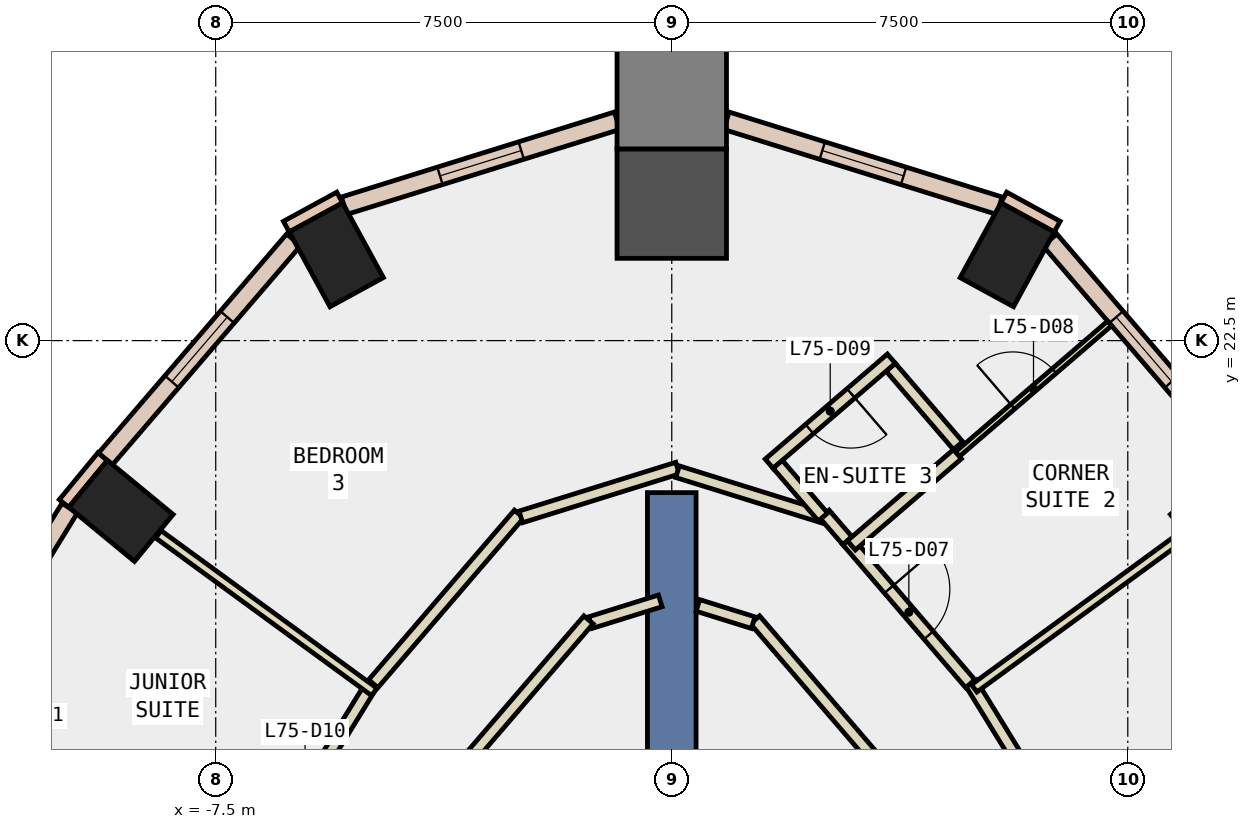
"""IFC4 building model, lengths in metres.
Left out: names, types, materials, properties, quantities, classifications, styles, units other than length and angle.
Written with IfcOpenShell. Run it as: python <this file> out.ifc"""

import sys

from ifc_helpers import new_model, si_unit, direction, frame, frame_2d, origin, origin_2d, place, context, subcontext, project, spatial, rectangle, extrude, element, fill, save


model = new_model("IFC4")
c1 = context("Model", 3, precision=1e-05, world=origin(), true_north=direction((0.0, 1.0)))
c2 = subcontext(c1, "Body", "Model", "MODEL_VIEW")
j1 = project(units=[si_unit("LENGTHUNIT", "METRE"), si_unit("PLANEANGLEUNIT", "RADIAN")], contexts=[c1])
p1 = place(None, origin())
s1 = spatial("IfcSite", under=j1, at=p1, CompositionType="ELEMENT")
p2 = place(p1, origin())
s2 = spatial("IfcBuilding", under=s1, at=p2, CompositionType="ELEMENT")
p3 = place(p2, frame((0.0, 0.0, 318.8)))
s3 = spatial("IfcBuildingStorey", under=s2, at=p3, CompositionType="ELEMENT", Elevation=318.8)
for number, where, z_axis, x_axis in (
    (1, (9.059, 19.7, -0.34), (0.0, 0.0, 1.0), (-0.636, 0.772, 0.0)),
    (2, (5.517, 23.911, -0.34), (0.0, 0.0, 1.0), (-0.878, 0.479, 0.0)),
):
    element("IfcColumn", number, at=place(p3, frame(where, z_axis=z_axis, x_axis=x_axis)), inside=s3, PredefinedType="COLUMN", context=c2, shape_type="SweptSolid", body=[
        extrude(rectangle(XDim=1.0, YDim=1.4, at=origin_2d()), origin(), (0.0, 0.0, 1.0), 3.6),
    ])
p4 = place(p3, frame((0.0, 24.753, -0.34), z_axis=(0.0, 0.0, 1.0), x_axis=(0.0, 1.0, 0.0)))
e3 = element("IfcColumn", 3, at=p4, inside=s3, PredefinedType="COLUMN", context=c2, shape_type="SweptSolid", body=[
    extrude(rectangle(XDim=1.8, YDim=1.8, at=origin_2d()), origin(), (0.0, 0.0, 1.0), 3.6),
])
for number, where, z_axis, x_axis in (
    (4, (-5.517, 23.911, -0.34), (0.0, 0.0, 1.0), (0.878, 0.479, 0.0)),
    (5, (-9.059, 19.7, -0.34), (0.0, 0.0, 1.0), (0.636, 0.772, 0.0)),
):
    element("IfcColumn", number, at=place(p3, frame(where, z_axis=z_axis, x_axis=x_axis)), inside=s3, PredefinedType="COLUMN", context=c2, shape_type="SweptSolid", body=[
        extrude(rectangle(XDim=1.0, YDim=1.4, at=origin_2d()), origin(), (0.0, 0.0, 1.0), 3.6),
    ])
p5 = place(p3, frame((0.0, 26.553, -0.34), z_axis=(0.0, 0.0, 1.0), x_axis=(0.0, 1.0, 0.0)))
e6 = element("IfcColumn", 6, at=p5, inside=s3, PredefinedType="COLUMN", context=c2, shape_type="SweptSolid", body=[
    extrude(rectangle(XDim=1.8, YDim=1.8, at=origin_2d()), origin(), (0.0, 0.0, 1.0), 3.6),
])
p6 = place(p3, frame((0.0, 11.0, -0.34), z_axis=(0.0, 0.0, 1.0), x_axis=(0.0, 1.0, 0.0)))
e7 = element("IfcWall", 7, at=p6, inside=s3, PredefinedType="SHEAR", context=c2, shape_type="SweptSolid", body=[
    extrude(rectangle(XDim=9.0, YDim=0.8, at=frame_2d((4.5, 0.0))), origin(), (0.0, 0.0, 1.0), 3.6),
])
for number, where, z_axis, x_axis in (
    (8, (6.339, 24.374, 0.0), (0.0, 0.0, 1.0), (-0.878, 0.479, 0.0)),
    (9, (-5.461, 24.853, 0.0), (0.0, 0.0, 1.0), (-0.878, -0.479, 0.0)),
    (10, (-9.359, 20.594, 0.0), (0.0, 0.0, 1.0), (-0.636, -0.772, 0.0)),
):
    element("IfcWall", number, at=place(p3, frame(where, z_axis=z_axis, x_axis=x_axis)), inside=s3, PredefinedType="STANDARD", context=c2, shape_type="SweptSolid", body=[
        extrude(rectangle(XDim=1.0, YDim=0.2, at=frame_2d((0.5, 0.0))), origin(), (0.0, 0.0, 1.0), 3.26),
    ])
p7 = place(p3, frame((9.313, 20.555, 0.0), z_axis=(0.0, 0.0, 1.0), x_axis=(-0.651684474108, 0.758490175419, 0.0)))
e11 = element("IfcWall", 11, at=p7, inside=s3, PredefinedType="STANDARD", context=c2, shape_type="SweptSolid", body=[
    extrude(rectangle(XDim=4.748, YDim=0.3, at=frame_2d((2.374, 0.0))), origin(), (0.0, 0.0, 1.0), 3.26),
])
p8 = place(p7, frame((1.674, 0.0, 0.9)))
e12 = element("IfcOpeningElement", 12, at=p8, cuts=e11, PredefinedType="OPENING", context=c2, shape_type="SweptSolid", body=[
    extrude(rectangle(XDim=1.4, YDim=2.0, at=frame_2d((0.7, 1.0))), frame((0.0, 0.16, 0.0), z_axis=(0.0, -1.0, 0.0), x_axis=(1.0, 0.0, 0.0)), (0.0, 0.0, 1.0), 0.32),
])
p9 = place(p3, frame((5.389, 24.718, 0.0), z_axis=(0.0, 0.0, 1.0), x_axis=(-0.954792612552, 0.297272714886, 0.0)))
e13 = element("IfcWall", 13, at=p9, inside=s3, PredefinedType="STANDARD", context=c2, shape_type="SweptSolid", body=[
    extrude(rectangle(XDim=4.703, YDim=0.3, at=frame_2d((2.351, 0.0))), origin(), (0.0, 0.0, 1.0), 3.26),
])
p10 = place(p9, frame((1.651, 0.0, 0.9)))
e14 = element("IfcOpeningElement", 14, at=p10, cuts=e13, PredefinedType="OPENING", context=c2, shape_type="SweptSolid", body=[
    extrude(rectangle(XDim=1.4, YDim=2.0, at=frame_2d((0.7, 1.0))), frame((0.0, 0.16, 0.0), z_axis=(0.0, -1.0, 0.0), x_axis=(1.0, 0.0, 0.0)), (0.0, 0.0, 1.0), 0.32),
])
p11 = place(p3, frame((-0.899, 26.116, 0.0), z_axis=(0.0, 0.0, 1.0), x_axis=(-0.954792612552, -0.297272714886, 0.0)))
e15 = element("IfcWall", 15, at=p11, inside=s3, PredefinedType="STANDARD", context=c2, shape_type="SweptSolid", body=[
    extrude(rectangle(XDim=4.703, YDim=0.3, at=frame_2d((2.351, 0.0))), origin(), (0.0, 0.0, 1.0), 3.26),
])
p12 = place(p11, frame((1.651, 0.0, 0.9)))
e16 = element("IfcOpeningElement", 16, at=p12, cuts=e15, PredefinedType="OPENING", context=c2, shape_type="SweptSolid", body=[
    extrude(rectangle(XDim=1.4, YDim=2.0, at=frame_2d((0.7, 1.0))), frame((0.0, 0.16, 0.0), z_axis=(0.0, -1.0, 0.0), x_axis=(1.0, 0.0, 0.0)), (0.0, 0.0, 1.0), 0.32),
])
p13 = place(p3, frame((-6.219, 24.156, 0.0), z_axis=(0.0, 0.0, 1.0), x_axis=(-0.651684474108, -0.758490175419, 0.0)))
e17 = element("IfcWall", 17, at=p13, inside=s3, PredefinedType="STANDARD", context=c2, shape_type="SweptSolid", body=[
    extrude(rectangle(XDim=4.748, YDim=0.3, at=frame_2d((2.374, 0.0))), origin(), (0.0, 0.0, 1.0), 3.26),
])
p14 = place(p13, frame((1.674, 0.0, 0.9)))
e18 = element("IfcOpeningElement", 18, at=p14, cuts=e17, PredefinedType="OPENING", context=c2, shape_type="SweptSolid", body=[
    extrude(rectangle(XDim=1.4, YDim=2.0, at=frame_2d((0.7, 1.0))), frame((0.0, 0.16, 0.0), z_axis=(0.0, -1.0, 0.0), x_axis=(1.0, 0.0, 0.0)), (0.0, 0.0, 1.0), 0.32),
])
p15 = place(p3, frame((-9.901, 19.747, 0.0), z_axis=(0.0, 0.0, 1.0), x_axis=(-0.524004608874, -0.851715427757, 0.0)))
e19 = element("IfcWall", 19, at=p15, inside=s3, PredefinedType="STANDARD", context=c2, shape_type="SweptSolid", body=[
    extrude(rectangle(XDim=7.485, YDim=0.3, at=frame_2d((3.742, 0.0))), origin(), (0.0, 0.0, 1.0), 3.26),
])
p16 = place(p15, frame((0.771, 0.0, 0.9)))
e20 = element("IfcOpeningElement", 20, at=p16, cuts=e19, PredefinedType="OPENING", context=c2, shape_type="SweptSolid", body=[
    extrude(rectangle(XDim=2.2, YDim=2.0, at=frame_2d((1.1, 1.0))), frame((0.0, 0.16, 0.0), z_axis=(0.0, -1.0, 0.0), x_axis=(1.0, 0.0, 0.0)), (0.0, 0.0, 1.0), 0.32),
])
p17 = place(p15, frame((4.514, 0.0, 0.9)))
e21 = element("IfcOpeningElement", 21, at=p17, cuts=e19, PredefinedType="OPENING", context=c2, shape_type="SweptSolid", body=[
    extrude(rectangle(XDim=2.2, YDim=2.0, at=frame_2d((1.1, 1.0))), frame((0.0, 0.16, 0.0), z_axis=(0.0, -1.0, 0.0), x_axis=(1.0, 0.0, 0.0)), (0.0, 0.0, 1.0), 0.32),
])
p18 = place(p3, frame((3.289, 15.674, 0.0), z_axis=(0.0, 0.0, 1.0), x_axis=(-0.651848676423, 0.758349064116, 0.0)))
e22 = element("IfcWall", 22, at=p18, inside=s3, PredefinedType="PARTITIONING", context=c2, shape_type="SweptSolid", body=[
    extrude(rectangle(XDim=2.946, YDim=0.2, at=frame_2d((1.473, 0.0))), origin(), (0.0, 0.0, 1.0), 3.26),
])
p19 = place(p3, frame((1.339, 17.862, 0.0), z_axis=(0.0, 0.0, 1.0), x_axis=(-0.954826063502, 0.297165254457, 0.0)))
e23 = element("IfcWall", 23, at=p19, inside=s3, PredefinedType="PARTITIONING", context=c2, shape_type="SweptSolid", body=[
    extrude(rectangle(XDim=0.952, YDim=0.2, at=frame_2d((0.476, 0.0))), origin(), (0.0, 0.0, 1.0), 3.26),
])
p20 = place(p3, frame((-0.189, 18.22, 0.0), z_axis=(0.0, 0.0, 1.0), x_axis=(-0.954836332451, -0.297132257137, 0.0)))
e24 = element("IfcWall", 24, at=p20, inside=s3, PredefinedType="PARTITIONING", context=c2, shape_type="SweptSolid", body=[
    extrude(rectangle(XDim=1.205, YDim=0.2, at=frame_2d((0.602, 0.0))), origin(), (0.0, 0.0, 1.0), 3.26),
])
p21 = place(p3, frame((-1.369, 17.908, 0.0), z_axis=(0.0, 0.0, 1.0), x_axis=(-0.651848676423, -0.758349064116, 0.0)))
e25 = element("IfcWall", 25, at=p21, inside=s3, PredefinedType="PARTITIONING", context=c2, shape_type="SweptSolid", body=[
    extrude(rectangle(XDim=2.946, YDim=0.2, at=frame_2d((1.473, 0.0))), origin(), (0.0, 0.0, 1.0), 3.26),
])
p22 = place(p3, frame((4.922, 16.867, 0.0), z_axis=(0.0, 0.0, 1.0), x_axis=(0.523943621984, -0.851752945978, 0.0)))
e26 = element("IfcWall", 26, at=p22, inside=s3, PredefinedType="PARTITIONING", context=c2, shape_type="SweptSolid", body=[
    extrude(rectangle(XDim=8.06, YDim=0.2, at=frame_2d((4.03, 0.0))), origin(), (0.0, 0.0, 1.0), 3.26),
])
p23 = place(p3, frame((2.889, 19.209, 0.0), z_axis=(0.0, 0.0, 1.0), x_axis=(0.651686040861, -0.758488829283, 0.0)))
e27 = element("IfcWall", 27, at=p23, inside=s3, PredefinedType="PARTITIONING", context=c2, shape_type="SweptSolid", body=[
    extrude(rectangle(XDim=3.1, YDim=0.2, at=frame_2d((1.55, 0.0))), origin(), (0.0, 0.0, 1.0), 3.26),
])
p24 = place(p23, frame((1.05, 0.0, 0.0)))
e28 = element("IfcOpeningElement", 28, at=p24, cuts=e27, PredefinedType="OPENING", context=c2, shape_type="SweptSolid", body=[
    extrude(rectangle(XDim=1.0, YDim=2.1, at=frame_2d((0.5, 1.05))), frame((0.0, 0.11, 0.0), z_axis=(0.0, -1.0, 0.0), x_axis=(1.0, 0.0, 0.0)), (0.0, 0.0, 1.0), 0.22),
])
p25 = place(p3, frame((-4.909, 16.858, 0.0), z_axis=(0.0, 0.0, 1.0), x_axis=(0.651785835936, 0.758403074937, 0.0)))
e29 = element("IfcWall", 29, at=p25, inside=s3, PredefinedType="PARTITIONING", context=c2, shape_type="SweptSolid", body=[
    extrude(rectangle(XDim=3.677, YDim=0.2, at=frame_2d((1.839, 0.0))), origin(), (0.0, 0.0, 1.0), 3.26),
])
p26 = place(p3, frame((-2.482, 19.601, 0.0), z_axis=(0.0, 0.0, 1.0), x_axis=(0.95482540871, 0.297167358372, 0.0)))
e30 = element("IfcWall", 30, at=p26, inside=s3, PredefinedType="PARTITIONING", context=c2, shape_type="SweptSolid", body=[
    extrude(rectangle(XDim=2.699, YDim=0.2, at=frame_2d((1.349, 0.0))), origin(), (0.0, 0.0, 1.0), 3.26),
])
p27 = place(p3, frame((0.095, 20.344, 0.0), z_axis=(0.0, 0.0, 1.0), x_axis=(0.954837867825, -0.297127323158, 0.0)))
e31 = element("IfcWall", 31, at=p27, inside=s3, PredefinedType="PARTITIONING", context=c2, shape_type="SweptSolid", body=[
    extrude(rectangle(XDim=2.605, YDim=0.2, at=frame_2d((1.302, 0.0))), origin(), (0.0, 0.0, 1.0), 3.26),
])
p28 = place(p3, frame((2.512, 19.647, 0.0), z_axis=(0.0, 0.0, 1.0), x_axis=(0.652320947019, -0.757942862016, 0.0)))
e32 = element("IfcWall", 32, at=p28, inside=s3, PredefinedType="PARTITIONING", context=c2, shape_type="SweptSolid", body=[
    extrude(rectangle(XDim=0.578, YDim=0.2, at=frame_2d((0.289, 0.0))), origin(), (0.0, 0.0, 1.0), 3.26),
])
p29 = place(p3, frame((-7.101, 13.324, 0.0), z_axis=(0.0, 0.0, 1.0), x_axis=(0.52395735307, 0.851744499344, 0.0)))
e33 = element("IfcWall", 33, at=p29, inside=s3, PredefinedType="PARTITIONING", context=c2, shape_type="SweptSolid", body=[
    extrude(rectangle(XDim=4.084, YDim=0.2, at=frame_2d((2.042, 0.0))), origin(), (0.0, 0.0, 1.0), 3.26),
])
p30 = place(p29, frame((1.542, 0.0, 0.0)))
e34 = element("IfcOpeningElement", 34, at=p30, cuts=e33, PredefinedType="OPENING", context=c2, shape_type="SweptSolid", body=[
    extrude(rectangle(XDim=1.0, YDim=2.1, at=frame_2d((0.5, 1.05))), frame((0.0, 0.11, 0.0), z_axis=(0.0, -1.0, 0.0), x_axis=(1.0, 0.0, 0.0)), (0.0, 0.0, 1.0), 0.22),
])
p31 = place(p3, frame((4.974, 16.782, 0.0), z_axis=(0.0, 0.0, 1.0), x_axis=(0.807621211013, 0.589701602102, 0.0)))
e35 = element("IfcWall", 35, at=p31, inside=s3, PredefinedType="PARTITIONING", context=c2, shape_type="SweptSolid", body=[
    extrude(rectangle(XDim=4.295, YDim=0.15, at=frame_2d((2.148, 0.0))), origin(), (0.0, 0.0, 1.0), 3.26),
])
p32 = place(p3, frame((4.698, 20.632, 0.0), z_axis=(0.0, 0.0, 1.0), x_axis=(0.75843091069, 0.651753445491, 0.0)))
e36 = element("IfcWall", 36, at=p32, inside=s3, PredefinedType="PARTITIONING", context=c2, shape_type="SweptSolid", body=[
    extrude(rectangle(XDim=3.3, YDim=0.1, at=frame_2d((1.65, 0.0))), origin(), (0.0, 0.0, 1.0), 3.26),
])
p33 = place(p32, frame((1.2, 0.0, 0.0)))
e37 = element("IfcOpeningElement", 37, at=p33, cuts=e36, PredefinedType="OPENING", context=c2, shape_type="SweptSolid", body=[
    extrude(rectangle(XDim=0.9, YDim=2.1, at=frame_2d((0.45, 1.05))), frame((0.0, 0.06, 0.0), z_axis=(0.0, -1.0, 0.0), x_axis=(1.0, 0.0, 0.0)), (0.0, 0.0, 1.0), 0.12),
])
p34 = place(p3, frame((2.954, 19.133, 0.0), z_axis=(0.0, 0.0, 1.0), x_axis=(0.758341579104, 0.65185738425, 0.0)))
e38 = element("IfcWall", 38, at=p34, inside=s3, PredefinedType="PARTITIONING", context=c2, shape_type="SweptSolid", body=[
    extrude(rectangle(XDim=2.3, YDim=0.2, at=frame_2d((1.15, 0.0))), origin(), (0.0, 0.0, 1.0), 3.26),
])
p35 = place(p3, frame((4.709, 20.773, 0.0), z_axis=(0.0, 0.0, 1.0), x_axis=(-0.651808051275, 0.758383982092, 0.0)))
e39 = element("IfcWall", 39, at=p35, inside=s3, PredefinedType="PARTITIONING", context=c2, shape_type="SweptSolid", body=[
    extrude(rectangle(XDim=1.7, YDim=0.2, at=frame_2d((0.85, 0.0))), origin(), (0.0, 0.0, 1.0), 3.26),
])
p36 = place(p3, frame((3.611, 22.203, 0.0), z_axis=(0.0, 0.0, 1.0), x_axis=(-0.75836467248, -0.651830517493, 0.0)))
e40 = element("IfcWall", 40, at=p36, inside=s3, PredefinedType="PARTITIONING", context=c2, shape_type="SweptSolid", body=[
    extrude(rectangle(XDim=2.649, YDim=0.2, at=frame_2d((1.325, 0.0))), origin(), (0.0, 0.0, 1.0), 3.26),
])
p37 = place(p36, frame((0.875, 0.0, 0.0)))
e41 = element("IfcOpeningElement", 41, at=p37, cuts=e40, PredefinedType="OPENING", context=c2, shape_type="SweptSolid", body=[
    extrude(rectangle(XDim=0.9, YDim=2.1, at=frame_2d((0.45, 1.05))), frame((0.0, 0.11, 0.0), z_axis=(0.0, -1.0, 0.0), x_axis=(1.0, 0.0, 0.0)), (0.0, 0.0, 1.0), 0.22),
])
p38 = place(p3, frame((1.743, 20.465, 0.0), z_axis=(0.0, 0.0, 1.0), x_axis=(0.65174176003, -0.758440952371, 0.0)))
e42 = element("IfcWall", 42, at=p38, inside=s3, PredefinedType="PARTITIONING", context=c2, shape_type="SweptSolid", body=[
    extrude(rectangle(XDim=1.142, YDim=0.2, at=frame_2d((0.571, 0.0))), origin(), (0.0, 0.0, 1.0), 3.26),
])
p39 = place(p3, frame((-4.893, 16.723, 0.0), z_axis=(0.0, 0.0, 1.0), x_axis=(-0.807632235509, 0.589686503294, 0.0)))
e43 = element("IfcWall", 43, at=p39, inside=s3, PredefinedType="PARTITIONING", context=c2, shape_type="SweptSolid", body=[
    extrude(rectangle(XDim=4.396, YDim=0.15, at=frame_2d((2.198, 0.0))), origin(), (0.0, 0.0, 1.0), 3.26),
])
p40 = place(p3, frame((-9.519, 14.929, 0.0), z_axis=(0.0, 0.0, 1.0), x_axis=(-0.851621054013, 0.524157972715, 0.0)))
e44 = element("IfcWall", 44, at=p40, inside=s3, PredefinedType="PARTITIONING", context=c2, shape_type="SweptSolid", body=[
    extrude(rectangle(XDim=2.7, YDim=0.1, at=frame_2d((1.35, 0.0))), origin(), (0.0, 0.0, 1.0), 3.26),
])
p41 = place(p40, frame((0.9, 0.0, 0.0)))
e45 = element("IfcOpeningElement", 45, at=p41, cuts=e44, PredefinedType="OPENING", context=c2, shape_type="SweptSolid", body=[
    extrude(rectangle(XDim=0.9, YDim=2.1, at=frame_2d((0.45, 1.05))), frame((0.0, 0.06, 0.0), z_axis=(0.0, -1.0, 0.0), x_axis=(1.0, 0.0, 0.0)), (0.0, 0.0, 1.0), 0.12),
])
p42 = place(p8, origin())
e46 = element("IfcWindow", 46, at=p42, inside=s3, PartitioningType="SINGLE_PANEL", PredefinedType="WINDOW", context=c2, shape_type="SweptSolid", body=[
    extrude(rectangle(XDim=1.4, YDim=2.0, at=frame_2d((0.7, 1.0))), frame((0.0, 0.03, 0.0), z_axis=(0.0, -1.0, 0.0), x_axis=(1.0, 0.0, 0.0)), (0.0, 0.0, 1.0), 0.06),
])
fill(e12, e46)
p43 = place(p10, origin())
e47 = element("IfcWindow", 47, at=p43, inside=s3, PartitioningType="SINGLE_PANEL", PredefinedType="WINDOW", context=c2, shape_type="SweptSolid", body=[
    extrude(rectangle(XDim=1.4, YDim=2.0, at=frame_2d((0.7, 1.0))), frame((0.0, 0.03, 0.0), z_axis=(0.0, -1.0, 0.0), x_axis=(1.0, 0.0, 0.0)), (0.0, 0.0, 1.0), 0.06),
])
fill(e14, e47)
p44 = place(p12, origin())
e48 = element("IfcWindow", 48, at=p44, inside=s3, PartitioningType="SINGLE_PANEL", PredefinedType="WINDOW", context=c2, shape_type="SweptSolid", body=[
    extrude(rectangle(XDim=1.4, YDim=2.0, at=frame_2d((0.7, 1.0))), frame((0.0, 0.03, 0.0), z_axis=(0.0, -1.0, 0.0), x_axis=(1.0, 0.0, 0.0)), (0.0, 0.0, 1.0), 0.06),
])
fill(e16, e48)
p45 = place(p14, origin())
e49 = element("IfcWindow", 49, at=p45, inside=s3, PartitioningType="SINGLE_PANEL", PredefinedType="WINDOW", context=c2, shape_type="SweptSolid", body=[
    extrude(rectangle(XDim=1.4, YDim=2.0, at=frame_2d((0.7, 1.0))), frame((0.0, 0.03, 0.0), z_axis=(0.0, -1.0, 0.0), x_axis=(1.0, 0.0, 0.0)), (0.0, 0.0, 1.0), 0.06),
])
fill(e18, e49)
p46 = place(p24, origin())
e50 = element("IfcDoor", 50, at=p46, inside=s3, OperationType="SINGLE_SWING_LEFT", PredefinedType="DOOR", context=c2, shape_type="SweptSolid", body=[
    extrude(rectangle(XDim=1.0, YDim=2.1, at=frame_2d((0.5, 1.05))), frame((0.0, 0.025, 0.0), z_axis=(0.0, -1.0, 0.0), x_axis=(1.0, 0.0, 0.0)), (0.0, 0.0, 1.0), 0.05),
])
fill(e28, e50)
p47 = place(p33, origin())
e51 = element("IfcDoor", 51, at=p47, inside=s3, OperationType="SINGLE_SWING_RIGHT", PredefinedType="DOOR", context=c2, shape_type="SweptSolid", body=[
    extrude(rectangle(XDim=0.9, YDim=2.1, at=frame_2d((0.45, 1.05))), frame((0.0, 0.025, 0.0), z_axis=(0.0, -1.0, 0.0), x_axis=(1.0, 0.0, 0.0)), (0.0, 0.0, 1.0), 0.05),
])
fill(e37, e51)
p48 = place(p37, origin())
e52 = element("IfcDoor", 52, at=p48, inside=s3, OperationType="SINGLE_SWING_LEFT", PredefinedType="DOOR", context=c2, shape_type="SweptSolid", body=[
    extrude(rectangle(XDim=0.9, YDim=2.1, at=frame_2d((0.45, 1.05))), frame((0.0, 0.025, 0.0), z_axis=(0.0, -1.0, 0.0), x_axis=(1.0, 0.0, 0.0)), (0.0, 0.0, 1.0), 0.05),
])
fill(e41, e52)
save(model, sys.argv[1])
